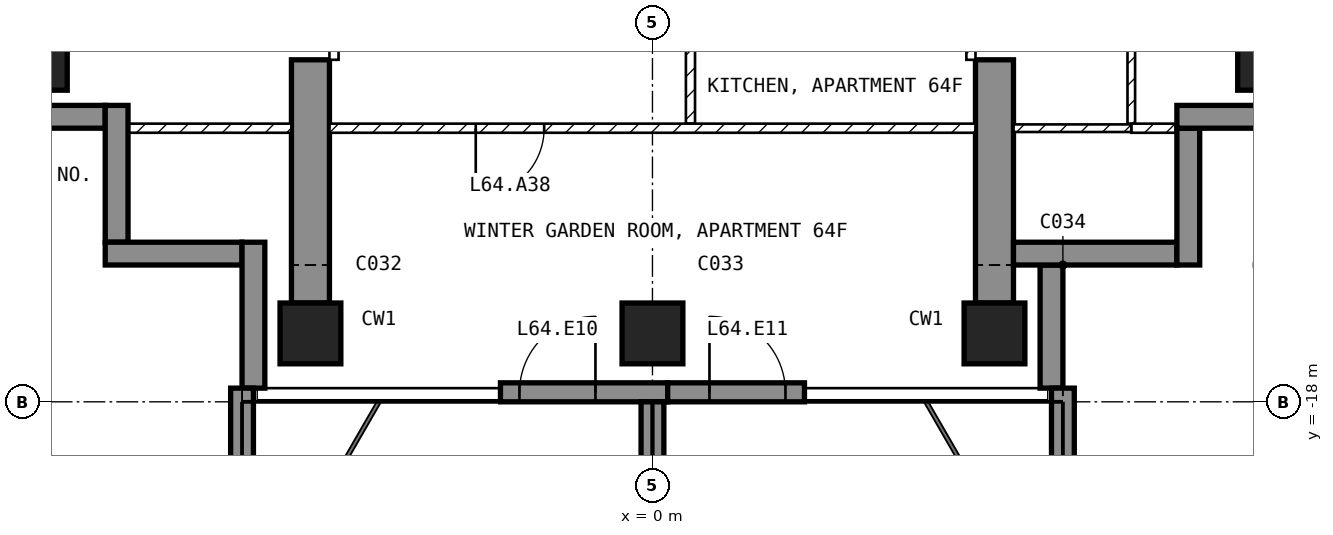
"""IFC4 building model, lengths in metres.
Left out: names, types, materials, properties, quantities, classifications, styles, units other than length and angle.
Written with IfcOpenShell. Run it as: python <this file> out.ifc"""

import sys

from ifc_helpers import new_model, si_unit, direction, frame, frame_2d, origin, origin_2d, place, context, subcontext, project, spatial, polyline, rectangle, outline, extrude, element, fill, save


model = new_model("IFC4")
c1 = context("Model", 3, precision=1e-05, world=origin(), true_north=direction((0.0, 1.0)))
c2 = subcontext(c1, "Body", "Model", "MODEL_VIEW")
j1 = project(units=[si_unit("LENGTHUNIT", "METRE"), si_unit("PLANEANGLEUNIT", "RADIAN")], contexts=[c1])
p1 = place(None, origin())
s1 = spatial("IfcSite", under=j1, at=p1, CompositionType="ELEMENT")
p2 = place(p1, origin())
s2 = spatial("IfcBuilding", under=s1, at=p2, CompositionType="ELEMENT")
p3 = place(p2, frame((0.0, 0.0, 253.5)))
s3 = spatial("IfcBuildingStorey", under=s2, at=p3, CompositionType="ELEMENT", Elevation=253.5)
for number, where, z_axis, x_axis in (
    (1, (-8.1, -13.5, -0.25), (0.0, 0.0, 1.0), (1.0, 0.0, 0.0)),
    (2, (-4.5, -17.1, -0.25), (0.0, 0.0, 1.0), (1.0, 0.0, 0.0)),
    (3, (0.0, -17.1, -0.25), (0.0, 0.0, 1.0), (1.0, 0.0, 0.0)),
    (4, (4.5, -17.1, -0.25), (0.0, 0.0, 1.0), (1.0, 0.0, 0.0)),
    (5, (8.1, -13.5, -0.25), (0.0, 0.0, 1.0), (1.0, 0.0, 0.0)),
):
    element("IfcColumn", number, at=place(p3, frame(where, z_axis=z_axis, x_axis=x_axis)), inside=s3, PredefinedType="COLUMN", context=c2, shape_type="SweptSolid", body=[
        extrude(rectangle(XDim=0.8, YDim=0.8, at=origin_2d()), origin(), (0.0, 0.0, 1.0), 3.5),
    ])
for number, where, z_axis, x_axis in (
    (6, (-4.75, -16.7, -0.25), (1.0, 0.0, 0.0), (0.0, 1.0, 0.0)),
    (7, (4.25, -16.7, -0.25), (1.0, 0.0, 0.0), (0.0, 1.0, 0.0)),
):
    element("IfcWall", number, at=place(p3, frame(where, z_axis=z_axis, x_axis=x_axis)), inside=s3, PredefinedType="SHEAR", context=c2, shape_type="SweptSolid", body=[
        extrude(outline(polyline([(0.0, 0.0), (3.2, 0.0), (3.2, 2.65), (5.6, 2.65), (5.6, 0.0), (7.7, 0.0), (7.7, 3.5), (0.0, 3.5), (0.0, 0.0)])), origin(), (0.0, 0.0, 1.0), 0.5),
    ])
p4 = place(p3, frame((-2.0, -17.875, 0.0), z_axis=(0.0, 0.0, 1.0), x_axis=(1.0, 0.0, 0.0)))
e8 = element("IfcWall", 8, at=p4, inside=s3, PredefinedType="SOLIDWALL", context=c2, shape_type="SweptSolid", body=[
    extrude(rectangle(XDim=2.2, YDim=0.25, at=frame_2d((1.1, 0.0))), origin(), (0.0, 0.0, 1.0), 3.25),
])
p5 = place(p4, frame((0.25, 0.0, 0.0)))
e9 = element("IfcOpeningElement", 9, at=p5, cuts=e8, PredefinedType="OPENING", context=c2, shape_type="SweptSolid", body=[
    extrude(rectangle(XDim=1.0, YDim=2.4, at=frame_2d((0.5, 1.2))), frame((0.0, 0.135, 0.0), z_axis=(0.0, -1.0, 0.0), x_axis=(1.0, 0.0, 0.0)), (0.0, 0.0, 1.0), 0.27),
])
p6 = place(p3, frame((0.2, -17.875, 0.0), z_axis=(0.0, 0.0, 1.0), x_axis=(1.0, 0.0, 0.0)))
e10 = element("IfcWall", 10, at=p6, inside=s3, PredefinedType="SOLIDWALL", context=c2, shape_type="SweptSolid", body=[
    extrude(rectangle(XDim=1.8, YDim=0.25, at=frame_2d((0.9, 0.0))), origin(), (0.0, 0.0, 1.0), 3.25),
])
p7 = place(p6, frame((0.55, 0.0, 0.0)))
e11 = element("IfcOpeningElement", 11, at=p7, cuts=e10, PredefinedType="OPENING", context=c2, shape_type="SweptSolid", body=[
    extrude(rectangle(XDim=1.0, YDim=2.4, at=frame_2d((0.5, 1.2))), frame((0.0, 0.135, 0.0), z_axis=(0.0, -1.0, 0.0), x_axis=(1.0, 0.0, 0.0)), (0.0, 0.0, 1.0), 0.27),
])
p8 = place(p3, frame((5.25, -17.82, 0.0), z_axis=(0.0, 0.0, 1.0), x_axis=(0.0, 1.0, 0.0)))
e12 = element("IfcWall", 12, at=p8, inside=s3, PredefinedType="SOLIDWALL", context=c2, shape_type="SweptSolid", body=[
    extrude(rectangle(XDim=1.62, YDim=0.3, at=frame_2d((0.81, 0.0))), origin(), (0.0, 0.0, 1.0), 3.25),
])
p9 = place(p3, frame((4.75, -16.05, 0.0), z_axis=(0.0, 0.0, 1.0), x_axis=(1.0, 0.0, 0.0)))
e13 = element("IfcWall", 13, at=p9, inside=s3, PredefinedType="SOLIDWALL", context=c2, shape_type="SweptSolid", body=[
    extrude(rectangle(XDim=2.15, YDim=0.3, at=frame_2d((1.075, 0.0))), origin(), (0.0, 0.0, 1.0), 3.25),
])
p10 = place(p3, frame((7.05, -16.2, 0.0), z_axis=(0.0, 0.0, 1.0), x_axis=(0.0, 1.0, 0.0)))
e14 = element("IfcWall", 14, at=p10, inside=s3, PredefinedType="SOLIDWALL", context=c2, shape_type="SweptSolid", body=[
    extrude(rectangle(XDim=1.8, YDim=0.3, at=frame_2d((0.9, 0.0))), origin(), (0.0, 0.0, 1.0), 3.25),
])
p11 = place(p3, frame((6.9, -14.25, 0.0), z_axis=(0.0, 0.0, 1.0), x_axis=(1.0, 0.0, 0.0)))
e15 = element("IfcWall", 15, at=p11, inside=s3, PredefinedType="SOLIDWALL", context=c2, shape_type="SweptSolid", body=[
    extrude(rectangle(XDim=1.85, YDim=0.3, at=frame_2d((0.925, 0.0))), origin(), (0.0, 0.0, 1.0), 3.25),
])
p12 = place(p3, frame((-8.75, -14.25, 0.0), z_axis=(0.0, 0.0, 1.0), x_axis=(1.0, 0.0, 0.0)))
e16 = element("IfcWall", 16, at=p12, inside=s3, PredefinedType="SOLIDWALL", context=c2, shape_type="SweptSolid", body=[
    extrude(rectangle(XDim=1.55, YDim=0.3, at=frame_2d((0.775, 0.0))), origin(), (0.0, 0.0, 1.0), 3.25),
])
p13 = place(p3, frame((-7.05, -14.1, 0.0), z_axis=(0.0, 0.0, 1.0), x_axis=(0.0, -1.0, 0.0)))
e17 = element("IfcWall", 17, at=p13, inside=s3, PredefinedType="SOLIDWALL", context=c2, shape_type="SweptSolid", body=[
    extrude(rectangle(XDim=1.8, YDim=0.3, at=frame_2d((0.9, 0.0))), origin(), (0.0, 0.0, 1.0), 3.25),
])
p14 = place(p3, frame((-7.2, -16.05, 0.0), z_axis=(0.0, 0.0, 1.0), x_axis=(1.0, 0.0, 0.0)))
e18 = element("IfcWall", 18, at=p14, inside=s3, PredefinedType="SOLIDWALL", context=c2, shape_type="SweptSolid", body=[
    extrude(rectangle(XDim=1.8, YDim=0.3, at=frame_2d((0.9, 0.0))), origin(), (0.0, 0.0, 1.0), 3.25),
])
p15 = place(p3, frame((-5.25, -15.9, 0.0), z_axis=(0.0, 0.0, 1.0), x_axis=(0.0, -1.0, 0.0)))
e19 = element("IfcWall", 19, at=p15, inside=s3, PredefinedType="SOLIDWALL", context=c2, shape_type="SweptSolid", body=[
    extrude(rectangle(XDim=1.92, YDim=0.3, at=frame_2d((0.96, 0.0))), origin(), (0.0, 0.0, 1.0), 3.25),
])
p16 = place(p3, frame((-5.4, -17.82, 0.0), z_axis=(0.0, 0.0, 1.0), x_axis=(0.0, -1.0, 0.0)))
e20 = element("IfcWall", 20, at=p16, inside=s3, PredefinedType="SOLIDWALL", context=c2, shape_type="SweptSolid", body=[
    extrude(rectangle(XDim=2.88, YDim=0.3, at=frame_2d((1.44, 0.0))), origin(), (0.0, 0.0, 1.0), 3.25),
])
p17 = place(p3, frame((0.0, -18.0, 0.0), z_axis=(0.0, 0.0, 1.0), x_axis=(0.0, -1.0, 0.0)))
e21 = element("IfcWall", 21, at=p17, inside=s3, PredefinedType="SOLIDWALL", context=c2, shape_type="SweptSolid", body=[
    extrude(rectangle(XDim=2.7, YDim=0.3, at=frame_2d((1.35, 0.0))), origin(), (0.0, 0.0, 1.0), 3.25),
])
p18 = place(p3, frame((5.4, -17.82, 0.0), z_axis=(0.0, 0.0, 1.0), x_axis=(0.0, -1.0, 0.0)))
e22 = element("IfcWall", 22, at=p18, inside=s3, PredefinedType="SOLIDWALL", context=c2, shape_type="SweptSolid", body=[
    extrude(rectangle(XDim=2.88, YDim=0.3, at=frame_2d((1.44, 0.0))), origin(), (0.0, 0.0, 1.0), 3.25),
])
p19 = place(p3, frame((0.5, -11.46, 0.0), z_axis=(0.0, 0.0, 1.0), x_axis=(0.0, -1.0, 0.0)))
e23 = element("IfcWall", 23, at=p19, inside=s3, PredefinedType="PARTITIONING", context=c2, shape_type="SweptSolid", body=[
    extrude(rectangle(XDim=2.88, YDim=0.12, at=frame_2d((1.44, 0.0))), origin(), (0.0, 0.0, 1.0), 3.25),
])
p20 = place(p19, frame((0.99, 0.0, 0.0)))
e24 = element("IfcOpeningElement", 24, at=p20, cuts=e23, PredefinedType="OPENING", context=c2, shape_type="SweptSolid", body=[
    extrude(rectangle(XDim=0.9, YDim=2.1, at=frame_2d((0.45, 1.05))), frame((0.0, 0.07, 0.0), z_axis=(0.0, -1.0, 0.0), x_axis=(1.0, 0.0, 0.0)), (0.0, 0.0, 1.0), 0.14),
])
p21 = place(p3, frame((4.25, -14.4, 0.0), z_axis=(0.0, 0.0, 1.0), x_axis=(-1.0, 0.0, 0.0)))
e25 = element("IfcWall", 25, at=p21, inside=s3, PredefinedType="PARTITIONING", context=c2, shape_type="SweptSolid", body=[
    extrude(rectangle(XDim=8.5, YDim=0.12, at=frame_2d((4.25, 0.0))), origin(), (0.0, 0.0, 1.0), 3.25),
])
p22 = place(p21, frame((5.675, 0.0, 0.0)))
e26 = element("IfcOpeningElement", 26, at=p22, cuts=e25, PredefinedType="OPENING", context=c2, shape_type="SweptSolid", body=[
    extrude(rectangle(XDim=0.9, YDim=2.1, at=frame_2d((0.45, 1.05))), frame((0.0, 0.07, 0.0), z_axis=(0.0, -1.0, 0.0), x_axis=(1.0, 0.0, 0.0)), (0.0, 0.0, 1.0), 0.14),
])
p23 = place(p3, frame((6.3, -14.34, 0.0), z_axis=(0.0, 0.0, 1.0), x_axis=(0.0, 1.0, 0.0)))
e27 = element("IfcWall", 27, at=p23, inside=s3, PredefinedType="PARTITIONING", context=c2, shape_type="SweptSolid", body=[
    extrude(rectangle(XDim=2.89, YDim=0.1, at=frame_2d((1.445, 0.0))), origin(), (0.0, 0.0, 1.0), 3.25),
])
p24 = place(p23, frame((1.02, 0.0, 0.0)))
e28 = element("IfcOpeningElement", 28, at=p24, cuts=e27, PredefinedType="OPENING", context=c2, shape_type="SweptSolid", body=[
    extrude(rectangle(XDim=0.85, YDim=2.1, at=frame_2d((0.425, 1.05))), frame((0.0, 0.06, 0.0), z_axis=(0.0, -1.0, 0.0), x_axis=(1.0, 0.0, 0.0)), (0.0, 0.0, 1.0), 0.12),
])
p25 = place(p3, frame((7.12, -14.4, 0.0), z_axis=(0.0, 0.0, 1.0), x_axis=(-1.0, 0.0, 0.0)))
e29 = element("IfcWall", 29, at=p25, inside=s3, PredefinedType="PARTITIONING", context=c2, shape_type="SweptSolid", body=[
    extrude(rectangle(XDim=0.82, YDim=0.12, at=frame_2d((0.41, 0.0))), origin(), (0.0, 0.0, 1.0), 3.25),
])
p26 = place(p3, frame((6.3, -14.4, 0.0), z_axis=(0.0, 0.0, 1.0), x_axis=(-1.0, 0.0, 0.0)))
e30 = element("IfcWall", 30, at=p26, inside=s3, PredefinedType="PARTITIONING", context=c2, shape_type="SweptSolid", body=[
    extrude(rectangle(XDim=1.55, YDim=0.1, at=frame_2d((0.775, 0.0))), origin(), (0.0, 0.0, 1.0), 3.25),
])
p27 = place(p3, frame((-4.75, -14.4, 0.0), z_axis=(0.0, 0.0, 1.0), x_axis=(-1.0, 0.0, 0.0)))
e31 = element("IfcWall", 31, at=p27, inside=s3, PredefinedType="PARTITIONING", context=c2, shape_type="SweptSolid", body=[
    extrude(rectangle(XDim=2.37, YDim=0.12, at=frame_2d((1.185, 0.0))), origin(), (0.0, 0.0, 1.0), 3.25),
])
p28 = place(p3, frame((4.19, -11.1, 0.0), z_axis=(0.0, 0.0, 1.0), x_axis=(0.0, -1.0, 0.0)))
e32 = element("IfcWall", 32, at=p28, inside=s3, PredefinedType="PARTITIONING", context=c2, shape_type="SweptSolid", body=[
    extrude(rectangle(XDim=2.4, YDim=0.12, at=frame_2d((1.2, 0.0))), origin(), (0.0, 0.0, 1.0), 2.4),
])
p29 = place(p28, frame((0.75, 0.0, 0.0)))
e33 = element("IfcOpeningElement", 33, at=p29, cuts=e32, PredefinedType="OPENING", context=c2, shape_type="SweptSolid", body=[
    extrude(rectangle(XDim=0.9, YDim=2.1, at=frame_2d((0.45, 1.05))), frame((0.0, 0.07, 0.0), z_axis=(0.0, -1.0, 0.0), x_axis=(1.0, 0.0, 0.0)), (0.0, 0.0, 1.0), 0.14),
])
p30 = place(p3, frame((-4.19, -11.1, 0.0), z_axis=(0.0, 0.0, 1.0), x_axis=(0.0, -1.0, 0.0)))
e34 = element("IfcWall", 34, at=p30, inside=s3, PredefinedType="PARTITIONING", context=c2, shape_type="SweptSolid", body=[
    extrude(rectangle(XDim=2.4, YDim=0.12, at=frame_2d((1.2, 0.0))), origin(), (0.0, 0.0, 1.0), 2.4),
])
p31 = place(p30, frame((0.75, 0.0, 0.0)))
e35 = element("IfcOpeningElement", 35, at=p31, cuts=e34, PredefinedType="OPENING", context=c2, shape_type="SweptSolid", body=[
    extrude(rectangle(XDim=0.9, YDim=2.1, at=frame_2d((0.45, 1.05))), frame((0.0, 0.07, 0.0), z_axis=(0.0, -1.0, 0.0), x_axis=(1.0, 0.0, 0.0)), (0.0, 0.0, 1.0), 0.14),
])
p32 = place(p5, origin())
e36 = element("IfcDoor", 36, at=p32, inside=s3, OperationType="SINGLE_SWING_RIGHT", PredefinedType="DOOR", context=c2, shape_type="SweptSolid", body=[
    extrude(rectangle(XDim=1.0, YDim=2.4, at=frame_2d((0.5, 1.2))), frame((0.0, 0.025, 0.0), z_axis=(0.0, -1.0, 0.0), x_axis=(1.0, 0.0, 0.0)), (0.0, 0.0, 1.0), 0.05),
])
fill(e9, e36)
p33 = place(p7, origin())
e37 = element("IfcDoor", 37, at=p33, inside=s3, OperationType="SINGLE_SWING_LEFT", PredefinedType="DOOR", context=c2, shape_type="SweptSolid", body=[
    extrude(rectangle(XDim=1.0, YDim=2.4, at=frame_2d((0.5, 1.2))), frame((0.0, 0.025, 0.0), z_axis=(0.0, -1.0, 0.0), x_axis=(1.0, 0.0, 0.0)), (0.0, 0.0, 1.0), 0.05),
])
fill(e11, e37)
p34 = place(p22, origin())
e38 = element("IfcDoor", 38, at=p34, inside=s3, OperationType="SINGLE_SWING_RIGHT", PredefinedType="DOOR", context=c2, shape_type="SweptSolid", body=[
    extrude(rectangle(XDim=0.9, YDim=2.1, at=frame_2d((0.45, 1.05))), frame((0.0, 0.025, 0.0), z_axis=(0.0, -1.0, 0.0), x_axis=(1.0, 0.0, 0.0)), (0.0, 0.0, 1.0), 0.05),
])
fill(e26, e38)
save(model, sys.argv[1])
